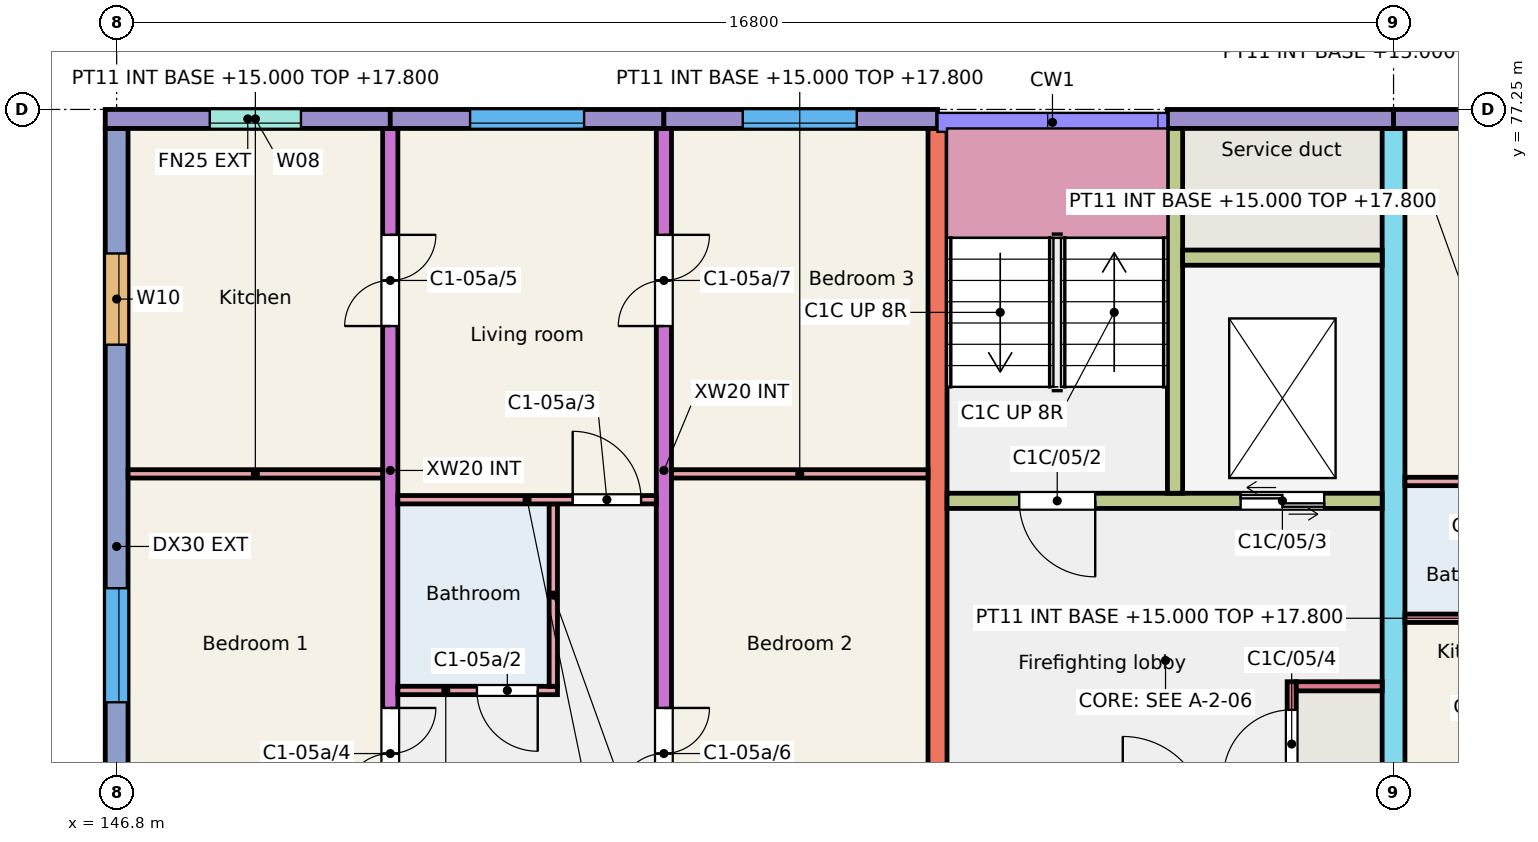
"""IFC4 building model, lengths in metres.
Left out: names, types, materials, properties, quantities, classifications, styles, units other than length and angle.
Written with IfcOpenShell. Run it as: python <this file> out.ifc"""

import sys

from ifc_helpers import new_model, si_unit, direction, frame, frame_2d, origin, place, context, subcontext, project, spatial, rectangle, extrude, element, fill, save


model = new_model("IFC4")
c1 = context("Model", 3, precision=1e-05, world=origin(), true_north=direction((0.0, 1.0)))
c2 = subcontext(c1, "Body", "Model", "MODEL_VIEW")
j1 = project(units=[si_unit("LENGTHUNIT", "METRE"), si_unit("PLANEANGLEUNIT", "RADIAN")], contexts=[c1])
p1 = place(None, origin())
s1 = spatial("IfcSite", under=j1, at=p1, CompositionType="ELEMENT")
p2 = place(p1, origin())
s2 = spatial("IfcBuilding", under=s1, at=p2, CompositionType="ELEMENT")
p3 = place(p2, frame((0.0, 0.0, 15.0)))
s3 = spatial("IfcBuildingStorey", under=s2, at=p3, CompositionType="ELEMENT", Elevation=15.0)
p4 = place(p3, frame((146.8, 66.0, 0.0), z_axis=(0.0, 0.0, 1.0), x_axis=(0.0, 1.0, 0.0)))
e1 = element("IfcWall", 1, at=p4, inside=s3, PredefinedType="SHEAR", context=c2, shape_type="SweptSolid", body=[
    extrude(rectangle(XDim=11.0, YDim=0.3, at=frame_2d((5.5, 0.0))), origin(), (0.0, 0.0, 1.0), 3.0),
])
p5 = place(p4, frame((3.45, 0.0, 0.9)))
e2 = element("IfcOpeningElement", 2, at=p5, cuts=e1, PredefinedType="OPENING", context=c2, shape_type="SweptSolid", body=[
    extrude(rectangle(XDim=1.5, YDim=1.5, at=frame_2d((0.75, 0.75))), frame((0.0, 0.16, 0.0), z_axis=(0.0, -1.0, 0.0), x_axis=(1.0, 0.0, 0.0)), (0.0, 0.0, 1.0), 0.32),
])
p6 = place(p4, frame((8.155, 0.0, 0.9)))
e3 = element("IfcOpeningElement", 3, at=p6, cuts=e1, PredefinedType="OPENING", context=c2, shape_type="SweptSolid", body=[
    extrude(rectangle(XDim=1.2, YDim=1.5, at=frame_2d((0.6, 0.75))), frame((0.0, 0.16, 0.0), z_axis=(0.0, -1.0, 0.0), x_axis=(1.0, 0.0, 0.0)), (0.0, 0.0, 1.0), 0.32),
])
p7 = place(p3, frame((150.4, 68.0, 0.0), z_axis=(0.0, 0.0, 1.0), x_axis=(0.0, 1.0, 0.0)))
e4 = element("IfcWall", 4, at=p7, inside=s3, PredefinedType="SHEAR", context=c2, shape_type="SweptSolid", body=[
    extrude(rectangle(XDim=9.0, YDim=0.2, at=frame_2d((4.5, 0.0))), origin(), (0.0, 0.0, 1.0), 3.0),
])
p8 = place(p7, frame((0.175, 0.0, 0.0)))
e5 = element("IfcOpeningElement", 5, at=p8, cuts=e4, PredefinedType="OPENING", context=c2, shape_type="SweptSolid", body=[
    extrude(rectangle(XDim=1.2, YDim=2.1, at=frame_2d((0.6, 1.05))), frame((0.0, 0.11, 0.0), z_axis=(0.0, -1.0, 0.0), x_axis=(1.0, 0.0, 0.0)), (0.0, 0.0, 1.0), 0.22),
])
p9 = place(p7, frame((6.4, 0.0, 0.0)))
e6 = element("IfcOpeningElement", 6, at=p9, cuts=e4, PredefinedType="OPENING", context=c2, shape_type="SweptSolid", body=[
    extrude(rectangle(XDim=1.2, YDim=2.1, at=frame_2d((0.6, 1.05))), frame((0.0, 0.11, 0.0), z_axis=(0.0, -1.0, 0.0), x_axis=(1.0, 0.0, 0.0)), (0.0, 0.0, 1.0), 0.22),
])
p10 = place(p3, frame((154.0, 68.0, 0.0), z_axis=(0.0, 0.0, 1.0), x_axis=(0.0, 1.0, 0.0)))
e7 = element("IfcWall", 7, at=p10, inside=s3, PredefinedType="SHEAR", context=c2, shape_type="SweptSolid", body=[
    extrude(rectangle(XDim=9.0, YDim=0.2, at=frame_2d((4.5, 0.0))), origin(), (0.0, 0.0, 1.0), 3.0),
])
p11 = place(p10, frame((0.175, 0.0, 0.0)))
e8 = element("IfcOpeningElement", 8, at=p11, cuts=e7, PredefinedType="OPENING", context=c2, shape_type="SweptSolid", body=[
    extrude(rectangle(XDim=1.2, YDim=2.1, at=frame_2d((0.6, 1.05))), frame((0.0, 0.11, 0.0), z_axis=(0.0, -1.0, 0.0), x_axis=(1.0, 0.0, 0.0)), (0.0, 0.0, 1.0), 0.22),
])
p12 = place(p10, frame((6.4, 0.0, 0.0)))
e9 = element("IfcOpeningElement", 9, at=p12, cuts=e7, PredefinedType="OPENING", context=c2, shape_type="SweptSolid", body=[
    extrude(rectangle(XDim=1.2, YDim=2.1, at=frame_2d((0.6, 1.05))), frame((0.0, 0.11, 0.0), z_axis=(0.0, -1.0, 0.0), x_axis=(1.0, 0.0, 0.0)), (0.0, 0.0, 1.0), 0.22),
])
p13 = place(p3, frame((157.6, 68.0, 0.0), z_axis=(0.0, 0.0, 1.0), x_axis=(0.0, 1.0, 0.0)))
e10 = element("IfcWall", 10, at=p13, inside=s3, PredefinedType="SHEAR", context=c2, shape_type="SweptSolid", body=[
    extrude(rectangle(XDim=9.0, YDim=0.25, at=frame_2d((4.5, 0.0))), origin(), (0.0, 0.0, 1.0), 3.0),
])
p14 = place(p3, frame((163.6, 66.0, 0.0), z_axis=(0.0, 0.0, 1.0), x_axis=(0.0, 1.0, 0.0)))
e11 = element("IfcWall", 11, at=p14, inside=s3, PredefinedType="SHEAR", context=c2, shape_type="SweptSolid", body=[
    extrude(rectangle(XDim=11.0, YDim=0.3, at=frame_2d((5.5, 0.0))), origin(), (0.0, 0.0, 1.0), 3.0),
])
p15 = place(p14, frame((0.3, 0.0, 0.0)))
e12 = element("IfcOpeningElement", 12, at=p15, cuts=e11, PredefinedType="OPENING", context=c2, shape_type="SweptSolid", body=[
    extrude(rectangle(XDim=1.2, YDim=2.1, at=frame_2d((0.6, 1.05))), frame((0.0, 0.16, 0.0), z_axis=(0.0, -1.0, 0.0), x_axis=(1.0, 0.0, 0.0)), (0.0, 0.0, 1.0), 0.32),
])
p16 = place(p3, frame((146.65, 77.125, 0.0), z_axis=(0.0, 0.0, 1.0), x_axis=(1.0, 0.0, 0.0)))
e13 = element("IfcWall", 13, at=p16, inside=s3, PredefinedType="SOLIDWALL", context=c2, shape_type="SweptSolid", body=[
    extrude(rectangle(XDim=3.75, YDim=0.25, at=frame_2d((1.875, 0.0))), origin(), (0.0, 0.0, 1.0), 3.0),
])
p17 = place(p16, frame((1.375, 0.0, 1.1)))
e14 = element("IfcOpeningElement", 14, at=p17, cuts=e13, PredefinedType="OPENING", context=c2, shape_type="SweptSolid", body=[
    extrude(rectangle(XDim=1.2, YDim=1.3, at=frame_2d((0.6, 0.65))), frame((0.0, 0.135, 0.0), z_axis=(0.0, -1.0, 0.0), x_axis=(1.0, 0.0, 0.0)), (0.0, 0.0, 1.0), 0.27),
])
p18 = place(p3, frame((150.4, 77.125, 0.0), z_axis=(0.0, 0.0, 1.0), x_axis=(1.0, 0.0, 0.0)))
e15 = element("IfcWall", 15, at=p18, inside=s3, PredefinedType="SOLIDWALL", context=c2, shape_type="SweptSolid", body=[
    extrude(rectangle(XDim=3.6, YDim=0.25, at=frame_2d((1.8, 0.0))), origin(), (0.0, 0.0, 1.0), 3.0),
])
p19 = place(p18, frame((1.05, 0.0, 0.9)))
e16 = element("IfcOpeningElement", 16, at=p19, cuts=e15, PredefinedType="OPENING", context=c2, shape_type="SweptSolid", body=[
    extrude(rectangle(XDim=1.5, YDim=1.5, at=frame_2d((0.75, 0.75))), frame((0.0, 0.135, 0.0), z_axis=(0.0, -1.0, 0.0), x_axis=(1.0, 0.0, 0.0)), (0.0, 0.0, 1.0), 0.27),
])
p20 = place(p3, frame((154.0, 77.125, 0.0), z_axis=(0.0, 0.0, 1.0), x_axis=(1.0, 0.0, 0.0)))
e17 = element("IfcWall", 17, at=p20, inside=s3, PredefinedType="SOLIDWALL", context=c2, shape_type="SweptSolid", body=[
    extrude(rectangle(XDim=3.6, YDim=0.25, at=frame_2d((1.8, 0.0))), origin(), (0.0, 0.0, 1.0), 3.0),
])
p21 = place(p20, frame((1.038, 0.0, 0.9)))
e18 = element("IfcOpeningElement", 18, at=p21, cuts=e17, PredefinedType="OPENING", context=c2, shape_type="SweptSolid", body=[
    extrude(rectangle(XDim=1.5, YDim=1.5, at=frame_2d((0.75, 0.75))), frame((0.0, 0.135, 0.0), z_axis=(0.0, -1.0, 0.0), x_axis=(1.0, 0.0, 0.0)), (0.0, 0.0, 1.0), 0.27),
])
p22 = place(p3, frame((160.625, 77.125, 0.0), z_axis=(0.0, 0.0, 1.0), x_axis=(1.0, 0.0, 0.0)))
e19 = element("IfcWall", 19, at=p22, inside=s3, PredefinedType="SOLIDWALL", context=c2, shape_type="SweptSolid", body=[
    extrude(rectangle(XDim=2.975, YDim=0.25, at=frame_2d((1.488, 0.0))), origin(), (0.0, 0.0, 1.0), 3.0),
])
p23 = place(p3, frame((157.725, 72.1, 0.0), z_axis=(0.0, 0.0, 1.0), x_axis=(1.0, 0.0, 0.0)))
e20 = element("IfcWall", 20, at=p23, inside=s3, PredefinedType="SHEAR", context=c2, shape_type="SweptSolid", body=[
    extrude(rectangle(XDim=5.725, YDim=0.2, at=frame_2d((2.862, 0.0))), origin(), (0.0, 0.0, 1.0), 3.0),
])
p24 = place(p23, frame((0.95, 0.0, 0.0)))
e21 = element("IfcOpeningElement", 21, at=p24, cuts=e20, PredefinedType="OPENING", context=c2, shape_type="SweptSolid", body=[
    extrude(rectangle(XDim=1.0, YDim=2.1, at=frame_2d((0.5, 1.05))), frame((0.0, 0.11, 0.0), z_axis=(0.0, -1.0, 0.0), x_axis=(1.0, 0.0, 0.0)), (0.0, 0.0, 1.0), 0.22),
])
p25 = place(p23, frame((3.863, 0.0, 0.0)))
e22 = element("IfcOpeningElement", 22, at=p25, cuts=e20, PredefinedType="OPENING", context=c2, shape_type="SweptSolid", body=[
    extrude(rectangle(XDim=1.1, YDim=2.1, at=frame_2d((0.55, 1.05))), frame((0.0, 0.11, 0.0), z_axis=(0.0, -1.0, 0.0), x_axis=(1.0, 0.0, 0.0)), (0.0, 0.0, 1.0), 0.22),
])
p26 = place(p3, frame((160.725, 72.2, 0.0), z_axis=(0.0, 0.0, 1.0), x_axis=(0.0, 1.0, 0.0)))
e23 = element("IfcWall", 23, at=p26, inside=s3, PredefinedType="SHEAR", context=c2, shape_type="SweptSolid", body=[
    extrude(rectangle(XDim=4.8, YDim=0.2, at=frame_2d((2.4, 0.0))), origin(), (0.0, 0.0, 1.0), 3.0),
])
p27 = place(p3, frame((160.825, 75.3, 0.0), z_axis=(0.0, 0.0, 1.0), x_axis=(1.0, 0.0, 0.0)))
e24 = element("IfcWall", 24, at=p27, inside=s3, PredefinedType="SHEAR", context=c2, shape_type="SweptSolid", body=[
    extrude(rectangle(XDim=2.625, YDim=0.2, at=frame_2d((1.312, 0.0))), origin(), (0.0, 0.0, 1.0), 3.0),
])
p28 = place(p3, frame((162.26, 68.0, 0.0), z_axis=(0.0, 0.0, 1.0), x_axis=(0.0, 1.0, 0.0)))
e25 = element("IfcWall", 25, at=p28, inside=s3, PredefinedType="SHEAR", context=c2, shape_type="SweptSolid", body=[
    extrude(rectangle(XDim=1.72, YDim=0.12, at=frame_2d((0.86, 0.0))), origin(), (0.0, 0.0, 1.0), 3.0),
])
p29 = place(p28, frame((0.45, 0.0, 0.0)))
e26 = element("IfcOpeningElement", 26, at=p29, cuts=e25, PredefinedType="OPENING", context=c2, shape_type="SweptSolid", body=[
    extrude(rectangle(XDim=0.9, YDim=2.1, at=frame_2d((0.45, 1.05))), frame((0.0, 0.07, 0.0), z_axis=(0.0, -1.0, 0.0), x_axis=(1.0, 0.0, 0.0)), (0.0, 0.0, 1.0), 0.14),
])
p30 = place(p3, frame((162.32, 69.66, 0.0), z_axis=(0.0, 0.0, 1.0), x_axis=(1.0, 0.0, 0.0)))
e27 = element("IfcWall", 27, at=p30, inside=s3, PredefinedType="SHEAR", context=c2, shape_type="SweptSolid", body=[
    extrude(rectangle(XDim=1.13, YDim=0.12, at=frame_2d((0.565, 0.0))), origin(), (0.0, 0.0, 1.0), 3.0),
])
p31 = place(p3, frame((163.6, 77.125, 0.0), z_axis=(0.0, 0.0, 1.0), x_axis=(1.0, 0.0, 0.0)))
e28 = element("IfcWall", 28, at=p31, inside=s3, PredefinedType="SOLIDWALL", context=c2, shape_type="SweptSolid", body=[
    extrude(rectangle(XDim=3.6, YDim=0.25, at=frame_2d((1.8, 0.0))), origin(), (0.0, 0.0, 1.0), 3.0),
])
p32 = place(p31, frame((1.075, 0.0, 0.9)))
e29 = element("IfcOpeningElement", 29, at=p32, cuts=e28, PredefinedType="OPENING", context=c2, shape_type="SweptSolid", body=[
    extrude(rectangle(XDim=1.5, YDim=1.5, at=frame_2d((0.75, 0.75))), frame((0.0, 0.135, 0.0), z_axis=(0.0, -1.0, 0.0), x_axis=(1.0, 0.0, 0.0)), (0.0, 0.0, 1.0), 0.27),
])
p33 = place(p3, frame((150.5, 69.605, 0.0), z_axis=(0.0, 0.0, 1.0), x_axis=(1.0, 0.0, 0.0)))
e30 = element("IfcWall", 30, at=p33, inside=s3, PredefinedType="PARTITIONING", context=c2, shape_type="SweptSolid", body=[
    extrude(rectangle(XDim=2.1, YDim=0.11, at=frame_2d((1.05, 0.0))), origin(), (0.0, 0.0, 1.0), 2.8),
])
p34 = place(p33, frame((1.04, 0.0, 0.0)))
e31 = element("IfcOpeningElement", 31, at=p34, cuts=e30, PredefinedType="OPENING", context=c2, shape_type="SweptSolid", body=[
    extrude(rectangle(XDim=0.8, YDim=2.1, at=frame_2d((0.4, 1.05))), frame((0.0, 0.065, 0.0), z_axis=(0.0, -1.0, 0.0), x_axis=(1.0, 0.0, 0.0)), (0.0, 0.0, 1.0), 0.13),
])
p35 = place(p3, frame((152.545, 69.66, 0.0), z_axis=(0.0, 0.0, 1.0), x_axis=(0.0, 1.0, 0.0)))
e32 = element("IfcWall", 32, at=p35, inside=s3, PredefinedType="PARTITIONING", context=c2, shape_type="SweptSolid", body=[
    extrude(rectangle(XDim=2.4, YDim=0.11, at=frame_2d((1.2, 0.0))), origin(), (0.0, 0.0, 1.0), 2.8),
])
p36 = place(p3, frame((150.5, 72.115, 0.0), z_axis=(0.0, 0.0, 1.0), x_axis=(1.0, 0.0, 0.0)))
e33 = element("IfcWall", 33, at=p36, inside=s3, PredefinedType="PARTITIONING", context=c2, shape_type="SweptSolid", body=[
    extrude(rectangle(XDim=3.4, YDim=0.11, at=frame_2d((1.7, 0.0))), origin(), (0.0, 0.0, 1.0), 2.8),
])
p37 = place(p36, frame((2.3, 0.0, 0.0)))
e34 = element("IfcOpeningElement", 34, at=p37, cuts=e33, PredefinedType="OPENING", context=c2, shape_type="SweptSolid", body=[
    extrude(rectangle(XDim=0.9, YDim=2.1, at=frame_2d((0.45, 1.05))), frame((0.0, 0.065, 0.0), z_axis=(0.0, -1.0, 0.0), x_axis=(1.0, 0.0, 0.0)), (0.0, 0.0, 1.0), 0.13),
])
p38 = place(p3, frame((146.95, 72.455, 0.0), z_axis=(0.0, 0.0, 1.0), x_axis=(1.0, 0.0, 0.0)))
e35 = element("IfcWall", 35, at=p38, inside=s3, PredefinedType="PARTITIONING", context=c2, shape_type="SweptSolid", body=[
    extrude(rectangle(XDim=3.35, YDim=0.11, at=frame_2d((1.675, 0.0))), origin(), (0.0, 0.0, 1.0), 2.8),
])
p39 = place(p3, frame((154.1, 72.455, 0.0), z_axis=(0.0, 0.0, 1.0), x_axis=(1.0, 0.0, 0.0)))
e36 = element("IfcWall", 36, at=p39, inside=s3, PredefinedType="PARTITIONING", context=c2, shape_type="SweptSolid", body=[
    extrude(rectangle(XDim=3.375, YDim=0.11, at=frame_2d((1.688, 0.0))), origin(), (0.0, 0.0, 1.0), 2.8),
])
p40 = place(p3, frame((163.75, 70.555, 0.0), z_axis=(0.0, 0.0, 1.0), x_axis=(1.0, 0.0, 0.0)))
e37 = element("IfcWall", 37, at=p40, inside=s3, PredefinedType="PARTITIONING", context=c2, shape_type="SweptSolid", body=[
    extrude(rectangle(XDim=1.94, YDim=0.11, at=frame_2d((0.97, 0.0))), origin(), (0.0, 0.0, 1.0), 2.8),
])
p41 = place(p3, frame((163.75, 72.355, 0.0), z_axis=(0.0, 0.0, 1.0), x_axis=(1.0, 0.0, 0.0)))
e38 = element("IfcWall", 38, at=p41, inside=s3, PredefinedType="PARTITIONING", context=c2, shape_type="SweptSolid", body=[
    extrude(rectangle(XDim=3.35, YDim=0.11, at=frame_2d((1.675, 0.0))), origin(), (0.0, 0.0, 1.0), 2.8),
])
p42 = place(p41, frame((2.25, 0.0, 0.0)))
e39 = element("IfcOpeningElement", 39, at=p42, cuts=e38, PredefinedType="OPENING", context=c2, shape_type="SweptSolid", body=[
    extrude(rectangle(XDim=0.9, YDim=2.1, at=frame_2d((0.45, 1.05))), frame((0.0, 0.065, 0.0), z_axis=(0.0, -1.0, 0.0), x_axis=(1.0, 0.0, 0.0)), (0.0, 0.0, 1.0), 0.13),
])
p43 = place(p17, origin())
e40 = element("IfcWindow", 40, at=p43, inside=s3, PartitioningType="SINGLE_PANEL", PredefinedType="WINDOW", context=c2, shape_type="SweptSolid", body=[
    extrude(rectangle(XDim=1.2, YDim=1.3, at=frame_2d((0.6, 0.65))), frame((0.0, -0.025, 0.0), z_axis=(0.0, -1.0, 0.0), x_axis=(1.0, 0.0, 0.0)), (0.0, 0.0, 1.0), 0.06),
])
fill(e14, e40)
p44 = place(p21, origin())
e41 = element("IfcWindow", 41, at=p44, inside=s3, PartitioningType="SINGLE_PANEL", PredefinedType="WINDOW", context=c2, shape_type="SweptSolid", body=[
    extrude(rectangle(XDim=1.5, YDim=1.5, at=frame_2d((0.75, 0.75))), frame((0.0, -0.025, 0.0), z_axis=(0.0, -1.0, 0.0), x_axis=(1.0, 0.0, 0.0)), (0.0, 0.0, 1.0), 0.06),
])
fill(e18, e41)
p45 = place(p19, origin())
e42 = element("IfcWindow", 42, at=p45, inside=s3, PartitioningType="SINGLE_PANEL", PredefinedType="WINDOW", context=c2, shape_type="SweptSolid", body=[
    extrude(rectangle(XDim=1.5, YDim=1.5, at=frame_2d((0.75, 0.75))), frame((0.0, -0.025, 0.0), z_axis=(0.0, -1.0, 0.0), x_axis=(1.0, 0.0, 0.0)), (0.0, 0.0, 1.0), 0.06),
])
fill(e16, e42)
p46 = place(p5, origin())
e43 = element("IfcWindow", 43, at=p46, inside=s3, PartitioningType="SINGLE_PANEL", PredefinedType="WINDOW", context=c2, shape_type="SweptSolid", body=[
    extrude(rectangle(XDim=1.5, YDim=1.5, at=frame_2d((0.75, 0.75))), frame((0.0, 0.0, 0.0), z_axis=(0.0, -1.0, 0.0), x_axis=(1.0, 0.0, 0.0)), (0.0, 0.0, 1.0), 0.06),
])
fill(e2, e43)
p47 = place(p6, origin())
e44 = element("IfcWindow", 44, at=p47, inside=s3, PartitioningType="SINGLE_PANEL", PredefinedType="WINDOW", context=c2, shape_type="SweptSolid", body=[
    extrude(rectangle(XDim=1.2, YDim=1.5, at=frame_2d((0.6, 0.75))), frame((0.0, 0.0, 0.0), z_axis=(0.0, -1.0, 0.0), x_axis=(1.0, 0.0, 0.0)), (0.0, 0.0, 1.0), 0.06),
])
fill(e3, e44)
p48 = place(p34, origin())
e45 = element("IfcDoor", 45, at=p48, inside=s3, OperationType="SINGLE_SWING_RIGHT", PredefinedType="DOOR", context=c2, shape_type="SweptSolid", body=[
    extrude(rectangle(XDim=0.8, YDim=2.1, at=frame_2d((0.4, 1.05))), frame((0.0, 0.025, 0.0), z_axis=(0.0, -1.0, 0.0), x_axis=(1.0, 0.0, 0.0)), (0.0, 0.0, 1.0), 0.05),
])
fill(e31, e45)
p49 = place(p37, origin())
e46 = element("IfcDoor", 46, at=p49, inside=s3, OperationType="SINGLE_SWING_LEFT", PredefinedType="DOOR", context=c2, shape_type="SweptSolid", body=[
    extrude(rectangle(XDim=0.9, YDim=2.1, at=frame_2d((0.45, 1.05))), frame((0.0, 0.025, 0.0), z_axis=(0.0, -1.0, 0.0), x_axis=(1.0, 0.0, 0.0)), (0.0, 0.0, 1.0), 0.05),
])
fill(e34, e46)
p50 = place(p8, origin())
e47 = element("IfcDoor", 47, at=p50, inside=s3, OperationType="DOUBLE_DOOR_SINGLE_SWING", PredefinedType="DOOR", context=c2, shape_type="SweptSolid", body=[
    extrude(rectangle(XDim=1.2, YDim=2.1, at=frame_2d((0.6, 1.05))), frame((0.0, 0.025, 0.0), z_axis=(0.0, -1.0, 0.0), x_axis=(1.0, 0.0, 0.0)), (0.0, 0.0, 1.0), 0.05),
])
fill(e5, e47)
p51 = place(p9, origin())
e48 = element("IfcDoor", 48, at=p51, inside=s3, OperationType="DOUBLE_DOOR_SINGLE_SWING", PredefinedType="DOOR", context=c2, shape_type="SweptSolid", body=[
    extrude(rectangle(XDim=1.2, YDim=2.1, at=frame_2d((0.6, 1.05))), frame((0.0, 0.025, 0.0), z_axis=(0.0, -1.0, 0.0), x_axis=(1.0, 0.0, 0.0)), (0.0, 0.0, 1.0), 0.05),
])
fill(e6, e48)
p52 = place(p11, origin())
e49 = element("IfcDoor", 49, at=p52, inside=s3, OperationType="DOUBLE_DOOR_SINGLE_SWING", PredefinedType="DOOR", context=c2, shape_type="SweptSolid", body=[
    extrude(rectangle(XDim=1.2, YDim=2.1, at=frame_2d((0.6, 1.05))), frame((0.0, 0.025, 0.0), z_axis=(0.0, -1.0, 0.0), x_axis=(1.0, 0.0, 0.0)), (0.0, 0.0, 1.0), 0.05),
])
fill(e8, e49)
p53 = place(p12, origin())
e50 = element("IfcDoor", 50, at=p53, inside=s3, OperationType="DOUBLE_DOOR_SINGLE_SWING", PredefinedType="DOOR", context=c2, shape_type="SweptSolid", body=[
    extrude(rectangle(XDim=1.2, YDim=2.1, at=frame_2d((0.6, 1.05))), frame((0.0, 0.025, 0.0), z_axis=(0.0, -1.0, 0.0), x_axis=(1.0, 0.0, 0.0)), (0.0, 0.0, 1.0), 0.05),
])
fill(e9, e50)
p54 = place(p24, origin())
e51 = element("IfcDoor", 51, at=p54, inside=s3, OperationType="SINGLE_SWING_RIGHT", PredefinedType="DOOR", context=c2, shape_type="SweptSolid", body=[
    extrude(rectangle(XDim=1.0, YDim=2.1, at=frame_2d((0.5, 1.05))), frame((0.0, 0.025, 0.0), z_axis=(0.0, -1.0, 0.0), x_axis=(1.0, 0.0, 0.0)), (0.0, 0.0, 1.0), 0.05),
])
fill(e21, e51)
p55 = place(p25, origin())
e52 = element("IfcDoor", 52, at=p55, inside=s3, OperationType="DOUBLE_DOOR_SLIDING", PredefinedType="DOOR", context=c2, shape_type="SweptSolid", body=[
    extrude(rectangle(XDim=1.1, YDim=2.1, at=frame_2d((0.55, 1.05))), frame((0.0, 0.025, 0.0), z_axis=(0.0, -1.0, 0.0), x_axis=(1.0, 0.0, 0.0)), (0.0, 0.0, 1.0), 0.05),
])
fill(e22, e52)
p56 = place(p29, origin())
e53 = element("IfcDoor", 53, at=p56, inside=s3, OperationType="SINGLE_SWING_LEFT", PredefinedType="DOOR", context=c2, shape_type="SweptSolid", body=[
    extrude(rectangle(XDim=0.9, YDim=2.1, at=frame_2d((0.45, 1.05))), frame((0.0, 0.025, 0.0), z_axis=(0.0, -1.0, 0.0), x_axis=(1.0, 0.0, 0.0)), (0.0, 0.0, 1.0), 0.05),
])
fill(e26, e53)
save(model, sys.argv[1])
